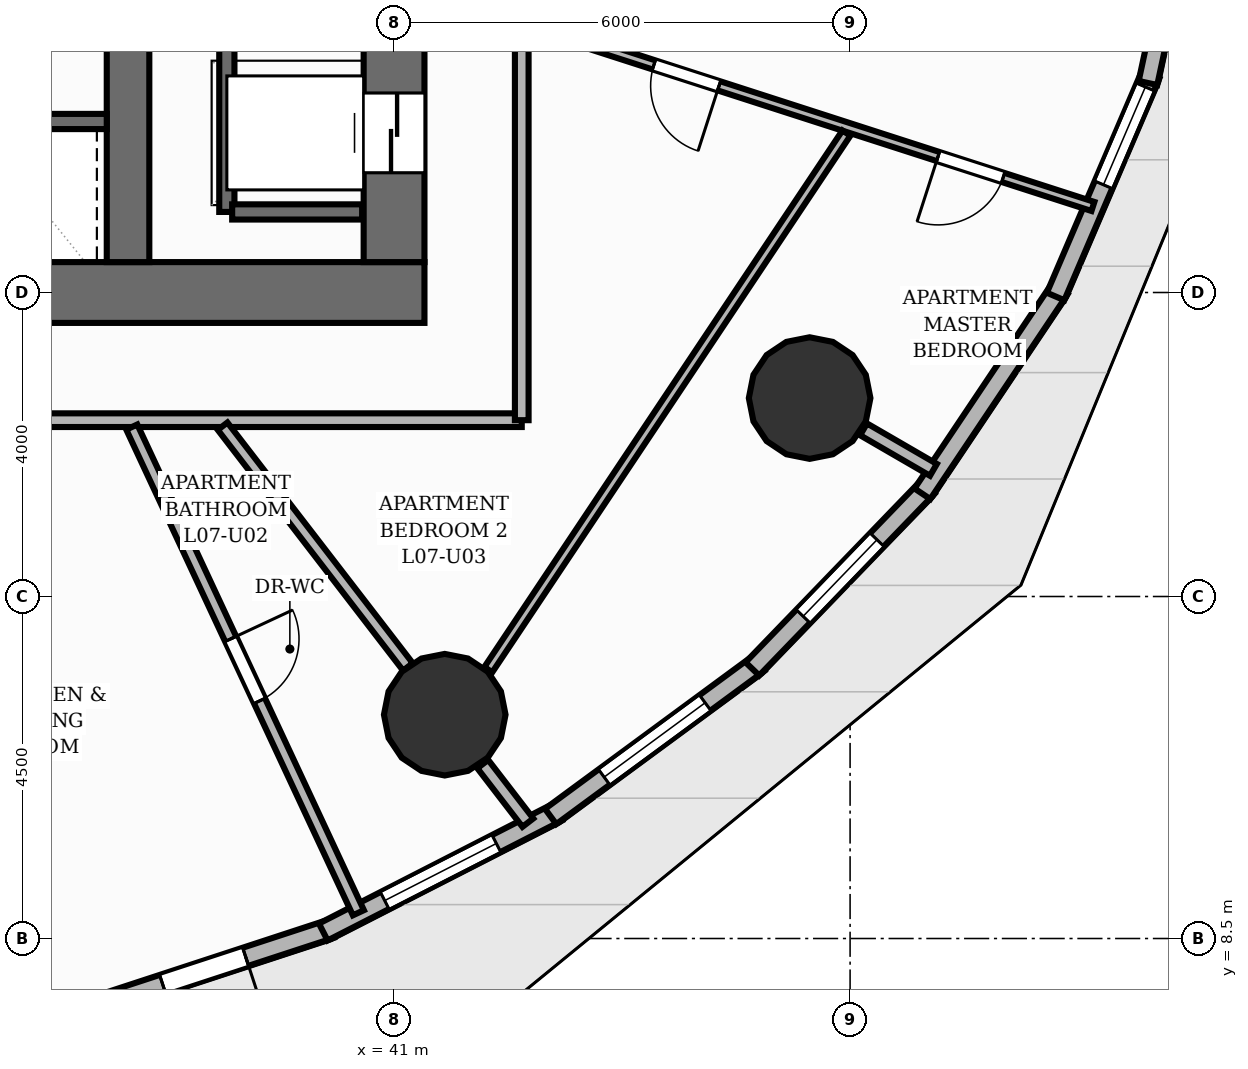
"""IFC4 building model, lengths in metres.
Left out: names, types, materials, properties, quantities, classifications, styles, units other than length and angle.
Written with IfcOpenShell. Run it as: python <this file> out.ifc"""

import sys

from ifc_helpers import new_model, si_unit, direction, frame, frame_2d, origin, origin_2d, place, context, subcontext, project, spatial, rectangle, circle, extrude, element, fill, save


model = new_model("IFC4")
c1 = context("Model", 3, precision=1e-05, world=origin(), true_north=direction((0.0, 1.0)))
c2 = subcontext(c1, "Body", "Model", "MODEL_VIEW")
j1 = project(units=[si_unit("LENGTHUNIT", "METRE"), si_unit("PLANEANGLEUNIT", "RADIAN")], contexts=[c1])
p1 = place(None, origin())
s1 = spatial("IfcSite", under=j1, at=p1, CompositionType="ELEMENT")
p2 = place(p1, origin())
s2 = spatial("IfcBuilding", under=s1, at=p2, CompositionType="ELEMENT")
p3 = place(p2, frame((0.0, 0.0, 28.0)))
s3 = spatial("IfcBuildingStorey", under=s2, at=p3, CompositionType="ELEMENT", Elevation=28.0)
p4 = place(p3, frame((22.6, 17.0, 0.0), z_axis=(0.0, 0.0, 1.0), x_axis=(1.0, 0.0, 0.0)))
e1 = element("IfcWall", 1, at=p4, inside=s3, PredefinedType="SHEAR", context=c2, shape_type="SweptSolid", body=[
    extrude(rectangle(XDim=18.8, YDim=0.8, at=frame_2d((9.4, 0.0))), origin(), (0.0, 0.0, 1.0), 3.2),
])
p5 = place(p4, frame((5.9, 0.0, 0.0)))
e2 = element("IfcOpeningElement", 2, at=p5, cuts=e1, PredefinedType="OPENING", context=c2, shape_type="SweptSolid", body=[
    extrude(rectangle(XDim=1.1, YDim=2.15, at=frame_2d((0.55, 1.075))), frame((0.0, 0.41, 0.0), z_axis=(0.0, -1.0, 0.0), x_axis=(1.0, 0.0, 0.0)), (0.0, 0.0, 1.0), 0.82),
])
p6 = place(p4, frame((9.45, 0.0, 0.0)))
e3 = element("IfcOpeningElement", 3, at=p6, cuts=e1, PredefinedType="OPENING", context=c2, shape_type="SweptSolid", body=[
    extrude(rectangle(XDim=0.9, YDim=2.1, at=frame_2d((0.45, 1.05))), frame((0.0, 0.41, 0.0), z_axis=(0.0, -1.0, 0.0), x_axis=(1.0, 0.0, 0.0)), (0.0, 0.0, 1.0), 0.82),
])
p7 = place(p3, frame((41.0, 17.4, 0.0), z_axis=(0.0, 0.0, 1.0), x_axis=(0.0, 1.0, 0.0)))
e4 = element("IfcWall", 4, at=p7, inside=s3, PredefinedType="SHEAR", context=c2, shape_type="SweptSolid", body=[
    extrude(rectangle(XDim=13.2, YDim=0.8, at=frame_2d((6.6, 0.0))), origin(), (0.0, 0.0, 1.0), 3.2),
])
p8 = place(p7, frame((1.175, 0.0, 0.0)))
e5 = element("IfcOpeningElement", 5, at=p8, cuts=e4, PredefinedType="OPENING", context=c2, shape_type="SweptSolid", body=[
    extrude(rectangle(XDim=1.05, YDim=2.15, at=frame_2d((0.525, 1.075))), frame((0.0, 0.41, 0.0), z_axis=(0.0, -1.0, 0.0), x_axis=(1.0, 0.0, 0.0)), (0.0, 0.0, 1.0), 0.82),
])
p9 = place(p7, frame((4.425, 0.0, 0.0)))
e6 = element("IfcOpeningElement", 6, at=p9, cuts=e4, PredefinedType="OPENING", context=c2, shape_type="SweptSolid", body=[
    extrude(rectangle(XDim=1.05, YDim=2.15, at=frame_2d((0.525, 1.075))), frame((0.0, 0.41, 0.0), z_axis=(0.0, -1.0, 0.0), x_axis=(1.0, 0.0, 0.0)), (0.0, 0.0, 1.0), 0.82),
])
p10 = place(p7, frame((7.725, 0.0, 0.0)))
e7 = element("IfcOpeningElement", 7, at=p10, cuts=e4, PredefinedType="OPENING", context=c2, shape_type="SweptSolid", body=[
    extrude(rectangle(XDim=1.05, YDim=2.15, at=frame_2d((0.525, 1.075))), frame((0.0, 0.41, 0.0), z_axis=(0.0, -1.0, 0.0), x_axis=(1.0, 0.0, 0.0)), (0.0, 0.0, 1.0), 0.82),
])
p11 = place(p7, frame((10.975, 0.0, 0.0)))
e8 = element("IfcOpeningElement", 8, at=p11, cuts=e4, PredefinedType="OPENING", context=c2, shape_type="SweptSolid", body=[
    extrude(rectangle(XDim=1.05, YDim=2.15, at=frame_2d((0.525, 1.075))), frame((0.0, 0.41, 0.0), z_axis=(0.0, -1.0, 0.0), x_axis=(1.0, 0.0, 0.0)), (0.0, 0.0, 1.0), 0.82),
])
p12 = place(p3, frame((37.5, 17.4, 0.0), z_axis=(0.0, 0.0, 1.0), x_axis=(0.0, 1.0, 0.0)))
e9 = element("IfcWall", 9, at=p12, inside=s3, PredefinedType="SHEAR", context=c2, shape_type="SweptSolid", body=[
    extrude(rectangle(XDim=13.2, YDim=0.56, at=frame_2d((6.6, 0.0))), origin(), (0.0, 0.0, 1.0), 3.2),
])
for number, where, z_axis, x_axis in (
    (10, (41.667, 11.445, 0.0), (0.0, 0.0, 1.0), (1.0, 0.0, 0.0)),
    (11, (46.468, 15.611, 0.0), (0.0, 0.0, 1.0), (1.0, 0.0, 0.0)),
):
    element("IfcColumn", number, at=place(p3, frame(where, z_axis=z_axis, x_axis=x_axis)), inside=s3, PredefinedType="COLUMN", context=c2, shape_type="SweptSolid", body=[
        extrude(circle(Radius=0.8, at=origin_2d()), origin(), (0.0, 0.0, 1.0), 3.2),
    ])
p13 = place(p3, frame((40.169, 8.627, 0.0), z_axis=(0.0, 0.0, 1.0), x_axis=(-0.950290237418, -0.311365484066, 0.0)))
e12 = element("IfcWall", 12, at=p13, inside=s3, PredefinedType="SOLIDWALL", context=c2, shape_type="SweptSolid", body=[
    extrude(rectangle(XDim=3.513, YDim=0.25, at=frame_2d((1.756, 0.0))), origin(), (0.0, 0.0, 1.0), 2.96),
])
p14 = place(p13, frame((1.181, 0.0, 0.0)))
e13 = element("IfcOpeningElement", 13, at=p14, cuts=e12, PredefinedType="OPENING", context=c2, shape_type="SweptSolid", body=[
    extrude(rectangle(XDim=1.15, YDim=2.2, at=frame_2d((0.575, 1.1))), frame((0.0, 0.135, 0.0), z_axis=(0.0, -1.0, 0.0), x_axis=(1.0, 0.0, 0.0)), (0.0, 0.0, 1.0), 0.27),
])
p15 = place(p3, frame((43.153, 10.164, 0.0), z_axis=(0.0, 0.0, 1.0), x_axis=(-0.890260122421, -0.455452428281, 0.0)))
e14 = element("IfcWall", 14, at=p15, inside=s3, PredefinedType="SOLIDWALL", context=c2, shape_type="SweptSolid", body=[
    extrude(rectangle(XDim=3.465, YDim=0.25, at=frame_2d((1.732, 0.0))), origin(), (0.0, 0.0, 1.0), 2.96),
])
p16 = place(p15, frame((0.907, 0.0, 0.85)))
e15 = element("IfcOpeningElement", 15, at=p16, cuts=e14, PredefinedType="OPENING", context=c2, shape_type="SweptSolid", body=[
    extrude(rectangle(XDim=1.65, YDim=1.55, at=frame_2d((0.825, 0.775))), frame((0.0, 0.135, 0.0), z_axis=(0.0, -1.0, 0.0), x_axis=(1.0, 0.0, 0.0)), (0.0, 0.0, 1.0), 0.27),
])
p17 = place(p3, frame((45.798, 12.12, 0.0), z_axis=(0.0, 0.0, 1.0), x_axis=(-0.805405938507, -0.592723606935, 0.0)))
e16 = element("IfcWall", 16, at=p17, inside=s3, PredefinedType="SOLIDWALL", context=c2, shape_type="SweptSolid", body=[
    extrude(rectangle(XDim=3.399, YDim=0.25, at=frame_2d((1.699, 0.0))), origin(), (0.0, 0.0, 1.0), 2.96),
])
p18 = place(p17, frame((0.875, 0.0, 0.85)))
e17 = element("IfcOpeningElement", 17, at=p18, cuts=e16, PredefinedType="OPENING", context=c2, shape_type="SweptSolid", body=[
    extrude(rectangle(XDim=1.65, YDim=1.55, at=frame_2d((0.825, 0.775))), frame((0.0, 0.135, 0.0), z_axis=(0.0, -1.0, 0.0), x_axis=(1.0, 0.0, 0.0)), (0.0, 0.0, 1.0), 0.27),
])
p19 = place(p3, frame((48.021, 14.438, 0.0), z_axis=(0.0, 0.0, 1.0), x_axis=(-0.694392538781, -0.719596416115, 0.0)))
e18 = element("IfcWall", 18, at=p19, inside=s3, PredefinedType="SOLIDWALL", context=c2, shape_type="SweptSolid", body=[
    extrude(rectangle(XDim=3.323, YDim=0.25, at=frame_2d((1.661, 0.0))), origin(), (0.0, 0.0, 1.0), 2.96),
])
p20 = place(p19, frame((0.961, 0.0, 0.85)))
e19 = element("IfcOpeningElement", 19, at=p20, cuts=e18, PredefinedType="OPENING", context=c2, shape_type="SweptSolid", body=[
    extrude(rectangle(XDim=1.4, YDim=1.55, at=frame_2d((0.7, 0.775))), frame((0.0, 0.135, 0.0), z_axis=(0.0, -1.0, 0.0), x_axis=(1.0, 0.0, 0.0)), (0.0, 0.0, 1.0), 0.27),
])
p21 = place(p3, frame((49.758, 17.047, 0.0), z_axis=(0.0, 0.0, 1.0), x_axis=(-0.556764929833, -0.83067009872, 0.0)))
e20 = element("IfcWall", 20, at=p21, inside=s3, PredefinedType="SOLIDWALL", context=c2, shape_type="SweptSolid", body=[
    extrude(rectangle(XDim=3.244, YDim=0.25, at=frame_2d((1.622, 0.0))), origin(), (0.0, 0.0, 1.0), 2.96),
])
p22 = place(p3, frame((50.954, 19.865, 0.0), z_axis=(0.0, 0.0, 1.0), x_axis=(-0.393733630937, -0.91922457967, 0.0)))
e21 = element("IfcWall", 21, at=p22, inside=s3, PredefinedType="SOLIDWALL", context=c2, shape_type="SweptSolid", body=[
    extrude(rectangle(XDim=3.174, YDim=0.25, at=frame_2d((1.587, 0.0))), origin(), (0.0, 0.0, 1.0), 2.96),
])
p23 = place(p22, frame((0.175, 0.0, 0.85)))
e22 = element("IfcOpeningElement", 22, at=p23, cuts=e21, PredefinedType="OPENING", context=c2, shape_type="SweptSolid", body=[
    extrude(rectangle(XDim=1.4, YDim=1.55, at=frame_2d((0.7, 0.775))), frame((0.0, 0.135, 0.0), z_axis=(0.0, -1.0, 0.0), x_axis=(1.0, 0.0, 0.0)), (0.0, 0.0, 1.0), 0.27),
])
p24 = place(p3, frame((51.573, 22.808, 0.0), z_axis=(0.0, 0.0, 1.0), x_axis=(-0.209668000253, -0.977772637002, 0.0)))
e23 = element("IfcWall", 23, at=p24, inside=s3, PredefinedType="SOLIDWALL", context=c2, shape_type="SweptSolid", body=[
    extrude(rectangle(XDim=3.121, YDim=0.25, at=frame_2d((1.56, 0.0))), origin(), (0.0, 0.0, 1.0), 2.96),
])
p25 = place(p3, frame((38.8, 18.06, 0.0), z_axis=(0.0, 0.0, 1.0), x_axis=(0.0, 1.0, 0.0)))
e24 = element("IfcWall", 24, at=p25, inside=s3, PredefinedType="SHEAR", context=c2, shape_type="SweptSolid", body=[
    extrude(rectangle(XDim=11.88, YDim=0.2, at=frame_2d((5.94, 0.0))), origin(), (0.0, 0.0, 1.0), 3.2),
])
p26 = place(p3, frame((38.87, 18.06, 0.0), z_axis=(0.0, 0.0, 1.0), x_axis=(1.0, 0.0, 0.0)))
e25 = element("IfcWall", 25, at=p26, inside=s3, PredefinedType="SHEAR", context=c2, shape_type="SweptSolid", body=[
    extrude(rectangle(XDim=1.71, YDim=0.2, at=frame_2d((0.855, 0.0))), origin(), (0.0, 0.0, 1.0), 3.2),
])
p27 = place(p3, frame((33.5, 19.25, 0.0), z_axis=(0.0, 0.0, 1.0), x_axis=(1.0, 0.0, 0.0)))
e26 = element("IfcWall", 26, at=p27, inside=s3, PredefinedType="SHEAR", context=c2, shape_type="SweptSolid", body=[
    extrude(rectangle(XDim=3.72, YDim=0.2, at=frame_2d((1.86, 0.0))), origin(), (0.0, 0.0, 1.0), 3.2),
])
p28 = place(p3, frame((42.167, 10.795, 0.0), z_axis=(0.0, 0.0, 1.0), x_axis=(0.609953343804, -0.792437327732, 0.0)))
e27 = element("IfcWall", 27, at=p28, inside=s3, PredefinedType="PARTITIONING", context=c2, shape_type="SweptSolid", body=[
    extrude(rectangle(XDim=0.973, YDim=0.18, at=frame_2d((0.486, 0.0))), origin(), (0.0, 0.0, 1.0), 2.178),
])
p29 = place(p3, frame((47.177, 15.2, 0.0), z_axis=(0.0, 0.0, 1.0), x_axis=(0.865001274409, -0.501769663562, 0.0)))
e28 = element("IfcWall", 28, at=p29, inside=s3, PredefinedType="PARTITIONING", context=c2, shape_type="SweptSolid", body=[
    extrude(rectangle(XDim=1.063, YDim=0.18, at=frame_2d((0.531, 0.0))), origin(), (0.0, 0.0, 1.0), 2.178),
])
p30 = place(p3, frame((42.68, 15.32, 0.0), z_axis=(0.0, 0.0, 1.0), x_axis=(-1.0, 0.0, 0.0)))
e29 = element("IfcWall", 29, at=p30, inside=s3, PredefinedType="PARTITIONING", context=c2, shape_type="SweptSolid", body=[
    extrude(rectangle(XDim=8.823, YDim=0.18, at=frame_2d((4.411, 0.0))), origin(), (0.0, 0.0, 1.0), 2.955),
])
p31 = place(p30, frame((6.462, 0.0, 0.0)))
e30 = element("IfcOpeningElement", 30, at=p31, cuts=e29, PredefinedType="OPENING", context=c2, shape_type="SweptSolid", body=[
    extrude(rectangle(XDim=1.05, YDim=2.15, at=frame_2d((0.525, 1.075))), frame((0.0, 0.1, 0.0), z_axis=(0.0, -1.0, 0.0), x_axis=(1.0, 0.0, 0.0)), (0.0, 0.0, 1.0), 0.2),
])
p32 = place(p3, frame((42.68, 32.68, 0.0), z_axis=(0.0, 0.0, 1.0), x_axis=(0.0, -1.0, 0.0)))
e31 = element("IfcWall", 31, at=p32, inside=s3, PredefinedType="PARTITIONING", context=c2, shape_type="SweptSolid", body=[
    extrude(rectangle(XDim=17.36, YDim=0.18, at=frame_2d((8.68, 0.0))), origin(), (0.0, 0.0, 1.0), 2.955),
])
p33 = place(p32, frame((10.24, 0.0, 0.0)))
e32 = element("IfcOpeningElement", 32, at=p33, cuts=e31, PredefinedType="OPENING", context=c2, shape_type="SweptSolid", body=[
    extrude(rectangle(XDim=1.05, YDim=2.15, at=frame_2d((0.525, 1.075))), frame((0.0, 0.1, 0.0), z_axis=(0.0, -1.0, 0.0), x_axis=(1.0, 0.0, 0.0)), (0.0, 0.0, 1.0), 0.2),
])
p34 = place(p3, frame((37.55, 15.229, 0.0), z_axis=(0.0, 0.0, 1.0), x_axis=(0.422745211231, -0.906248578692, 0.0)))
e33 = element("IfcWall", 33, at=p34, inside=s3, PredefinedType="PLUMBINGWALL", context=c2, shape_type="SweptSolid", body=[
    extrude(rectangle(XDim=7.052, YDim=0.16, at=frame_2d((3.526, 0.0))), origin(), (0.0, 0.0, 1.0), 2.641),
])
p35 = place(p34, frame((3.076, 0.0, 0.0)))
e34 = element("IfcOpeningElement", 34, at=p35, cuts=e33, PredefinedType="OPENING", context=c2, shape_type="SweptSolid", body=[
    extrude(rectangle(XDim=0.9, YDim=2.1, at=frame_2d((0.45, 1.05))), frame((0.0, 0.09, 0.0), z_axis=(0.0, -1.0, 0.0), x_axis=(1.0, 0.0, 0.0)), (0.0, 0.0, 1.0), 0.18),
])
p36 = place(p3, frame((38.744, 15.241, 0.0), z_axis=(0.0, 0.0, 1.0), x_axis=(0.610097434882, -0.792326397358, 0.0)))
e35 = element("IfcWall", 35, at=p36, inside=s3, PredefinedType="PLUMBINGWALL", context=c2, shape_type="SweptSolid", body=[
    extrude(rectangle(XDim=3.997, YDim=0.16, at=frame_2d((1.998, 0.0))), origin(), (0.0, 0.0, 1.0), 2.178),
])
p37 = place(p3, frame((50.195, 18.132, 0.0), z_axis=(0.0, 0.0, 1.0), x_axis=(-0.951723769721, 0.306955804879, 0.0)))
e36 = element("IfcWall", 36, at=p37, inside=s3, PredefinedType="PARTITIONING", context=c2, shape_type="SweptSolid", body=[
    extrude(rectangle(XDim=7.896, YDim=0.125, at=frame_2d((3.948, 0.0))), origin(), (0.0, 0.0, 1.0), 2.955),
])
p38 = place(p37, frame((1.241, 0.0, 0.0)))
e37 = element("IfcOpeningElement", 37, at=p38, cuts=e36, PredefinedType="OPENING", context=c2, shape_type="SweptSolid", body=[
    extrude(rectangle(XDim=0.9, YDim=2.1, at=frame_2d((0.45, 1.05))), frame((0.0, 0.073, 0.0), z_axis=(0.0, -1.0, 0.0), x_axis=(1.0, 0.0, 0.0)), (0.0, 0.0, 1.0), 0.145),
])
p39 = place(p37, frame((5.169, 0.0, 0.0)))
e38 = element("IfcOpeningElement", 38, at=p39, cuts=e36, PredefinedType="OPENING", context=c2, shape_type="SweptSolid", body=[
    extrude(rectangle(XDim=0.9, YDim=2.1, at=frame_2d((0.45, 1.05))), frame((0.0, 0.073, 0.0), z_axis=(0.0, -1.0, 0.0), x_axis=(1.0, 0.0, 0.0)), (0.0, 0.0, 1.0), 0.145),
])
p40 = place(p3, frame((42.24, 12.037, 0.0), z_axis=(0.0, 0.0, 1.0), x_axis=(0.55508513016, 0.831793543059, 0.0)))
e39 = element("IfcWall", 39, at=p40, inside=s3, PredefinedType="PARTITIONING", context=c2, shape_type="SweptSolid", body=[
    extrude(rectangle(XDim=8.488, YDim=0.125, at=frame_2d((4.244, 0.0))), origin(), (0.0, 0.0, 1.0), 2.328),
])
p41 = place(p14, origin())
e40 = element("IfcDoor", 40, at=p41, inside=s3, OperationType="SINGLE_SWING_LEFT", PredefinedType="DOOR", context=c2, shape_type="SweptSolid", body=[
    extrude(rectangle(XDim=1.15, YDim=2.2, at=frame_2d((0.575, 1.1))), frame((0.0, 0.025, 0.0), z_axis=(0.0, -1.0, 0.0), x_axis=(1.0, 0.0, 0.0)), (0.0, 0.0, 1.0), 0.05),
])
fill(e13, e40)
p42 = place(p16, origin())
e41 = element("IfcWindow", 41, at=p42, inside=s3, PartitioningType="SINGLE_PANEL", PredefinedType="WINDOW", context=c2, shape_type="SweptSolid", body=[
    extrude(rectangle(XDim=1.65, YDim=1.55, at=frame_2d((0.825, 0.775))), frame((0.0, 0.03, 0.0), z_axis=(0.0, -1.0, 0.0), x_axis=(1.0, 0.0, 0.0)), (0.0, 0.0, 1.0), 0.06),
])
fill(e15, e41)
p43 = place(p18, origin())
e42 = element("IfcWindow", 42, at=p43, inside=s3, PartitioningType="SINGLE_PANEL", PredefinedType="WINDOW", context=c2, shape_type="SweptSolid", body=[
    extrude(rectangle(XDim=1.65, YDim=1.55, at=frame_2d((0.825, 0.775))), frame((0.0, 0.03, 0.0), z_axis=(0.0, -1.0, 0.0), x_axis=(1.0, 0.0, 0.0)), (0.0, 0.0, 1.0), 0.06),
])
fill(e17, e42)
p44 = place(p20, origin())
e43 = element("IfcWindow", 43, at=p44, inside=s3, PartitioningType="SINGLE_PANEL", PredefinedType="WINDOW", context=c2, shape_type="SweptSolid", body=[
    extrude(rectangle(XDim=1.4, YDim=1.55, at=frame_2d((0.7, 0.775))), frame((0.0, 0.03, 0.0), z_axis=(0.0, -1.0, 0.0), x_axis=(1.0, 0.0, 0.0)), (0.0, 0.0, 1.0), 0.06),
])
fill(e19, e43)
p45 = place(p23, origin())
e44 = element("IfcWindow", 44, at=p45, inside=s3, PartitioningType="SINGLE_PANEL", PredefinedType="WINDOW", context=c2, shape_type="SweptSolid", body=[
    extrude(rectangle(XDim=1.4, YDim=1.55, at=frame_2d((0.7, 0.775))), frame((0.0, 0.03, 0.0), z_axis=(0.0, -1.0, 0.0), x_axis=(1.0, 0.0, 0.0)), (0.0, 0.0, 1.0), 0.06),
])
fill(e22, e44)
p46 = place(p8, origin())
e45 = element("IfcDoor", 45, at=p46, inside=s3, OperationType="DOUBLE_DOOR_SLIDING", PredefinedType="DOOR", context=c2, shape_type="SweptSolid", body=[
    extrude(rectangle(XDim=1.05, YDim=2.15, at=frame_2d((0.525, 1.075))), frame((0.0, 0.025, 0.0), z_axis=(0.0, -1.0, 0.0), x_axis=(1.0, 0.0, 0.0)), (0.0, 0.0, 1.0), 0.05),
])
fill(e5, e45)
p47 = place(p35, origin())
e46 = element("IfcDoor", 46, at=p47, inside=s3, OperationType="SINGLE_SWING_LEFT", PredefinedType="DOOR", context=c2, shape_type="SweptSolid", body=[
    extrude(rectangle(XDim=0.9, YDim=2.1, at=frame_2d((0.45, 1.05))), frame((0.0, 0.025, 0.0), z_axis=(0.0, -1.0, 0.0), x_axis=(1.0, 0.0, 0.0)), (0.0, 0.0, 1.0), 0.05),
])
fill(e34, e46)
p48 = place(p38, origin())
e47 = element("IfcDoor", 47, at=p48, inside=s3, OperationType="SINGLE_SWING_RIGHT", PredefinedType="DOOR", context=c2, shape_type="SweptSolid", body=[
    extrude(rectangle(XDim=0.9, YDim=2.1, at=frame_2d((0.45, 1.05))), frame((0.0, 0.025, 0.0), z_axis=(0.0, -1.0, 0.0), x_axis=(1.0, 0.0, 0.0)), (0.0, 0.0, 1.0), 0.05),
])
fill(e37, e47)
p49 = place(p39, origin())
e48 = element("IfcDoor", 48, at=p49, inside=s3, OperationType="SINGLE_SWING_LEFT", PredefinedType="DOOR", context=c2, shape_type="SweptSolid", body=[
    extrude(rectangle(XDim=0.9, YDim=2.1, at=frame_2d((0.45, 1.05))), frame((0.0, 0.025, 0.0), z_axis=(0.0, -1.0, 0.0), x_axis=(1.0, 0.0, 0.0)), (0.0, 0.0, 1.0), 0.05),
])
fill(e38, e48)
save(model, sys.argv[1])
